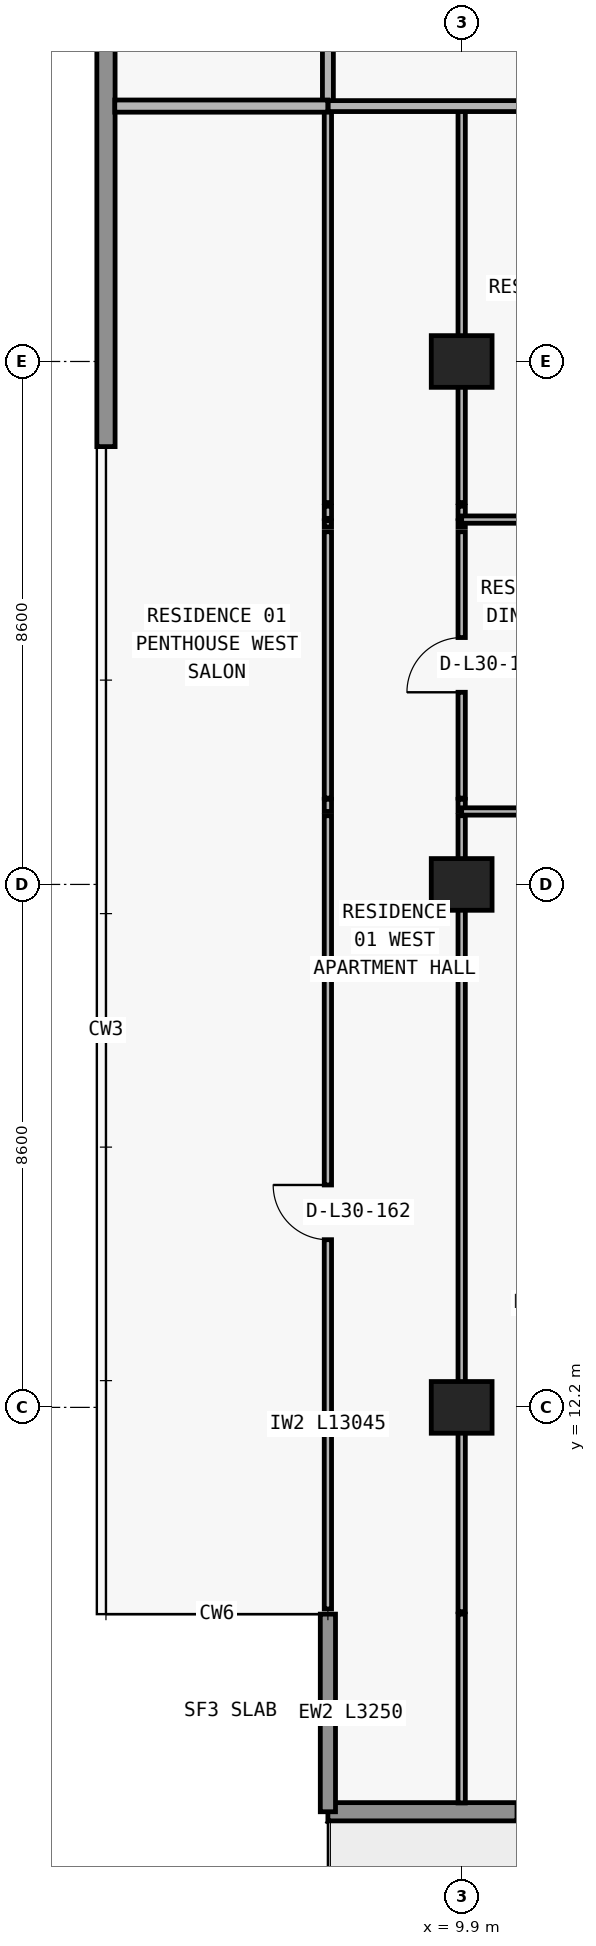
"""IFC4 building model, lengths in metres.
Left out: names, types, materials, properties, quantities, classifications, styles, units other than length and angle.
Written with IfcOpenShell. Run it as: python <this file> out.ifc"""

import sys

from ifc_helpers import new_model, si_unit, direction, frame, frame_2d, origin, origin_2d, place, context, subcontext, project, spatial, rectangle, extrude, element, fill, save


model = new_model("IFC4")
c1 = context("Model", 3, precision=1e-05, world=origin(), true_north=direction((0.0, 1.0)))
c2 = subcontext(c1, "Body", "Model", "MODEL_VIEW")
j1 = project(units=[si_unit("LENGTHUNIT", "METRE"), si_unit("PLANEANGLEUNIT", "RADIAN")], contexts=[c1])
p1 = place(None, origin())
s1 = spatial("IfcSite", under=j1, at=p1, CompositionType="ELEMENT")
p2 = place(p1, origin())
s2 = spatial("IfcBuilding", under=s1, at=p2, CompositionType="ELEMENT")
p3 = place(p2, frame((0.0, 0.0, 112.5)))
s3 = spatial("IfcBuildingStorey", under=s2, at=p3, CompositionType="ELEMENT", Elevation=112.5)
for number, where, z_axis, x_axis in (
    (1, (9.9, 12.2, 0.0), (0.0, 0.0, 1.0), (1.0, 0.0, 0.0)),
    (2, (9.9, 20.8, 0.0), (0.0, 0.0, 1.0), (1.0, 0.0, 0.0)),
    (3, (9.9, 29.4, 0.0), (0.0, 0.0, 1.0), (1.0, 0.0, 0.0)),
):
    element("IfcColumn", number, at=place(p3, frame(where, z_axis=z_axis, x_axis=x_axis)), inside=s3, PredefinedType="COLUMN", context=c2, shape_type="SweptSolid", body=[
        extrude(rectangle(XDim=1.0, YDim=0.85, at=origin_2d()), origin(), (0.0, 0.0, 1.0), 3.05),
    ])
p4 = place(p3, frame((70.1, 5.55, 0.0), z_axis=(0.0, 0.0, 1.0), x_axis=(-1.0, 0.0, 0.0)))
e4 = element("IfcWall", 4, at=p4, inside=s3, PredefinedType="STANDARD", context=c2, shape_type="SweptSolid", body=[
    extrude(rectangle(XDim=62.4, YDim=0.3, at=frame_2d((31.2, 0.0))), origin(), (0.0, 0.0, 1.0), 3.05),
])
p5 = place(p4, frame((57.29, 0.0, 0.0)))
e5 = element("IfcOpeningElement", 5, at=p5, cuts=e4, PredefinedType="OPENING", context=c2, shape_type="SweptSolid", body=[
    extrude(rectangle(XDim=2.0, YDim=2.3, at=frame_2d((1.0, 1.15))), frame((0.0, 0.16, 0.0), z_axis=(0.0, -1.0, 0.0), x_axis=(1.0, 0.0, 0.0)), (0.0, 0.0, 1.0), 0.32),
])
p6 = place(p4, frame((52.61, 0.0, 0.65)))
e6 = element("IfcOpeningElement", 6, at=p6, cuts=e4, PredefinedType="OPENING", context=c2, shape_type="SweptSolid", body=[
    extrude(rectangle(XDim=2.6, YDim=1.85, at=frame_2d((1.3, 0.925))), frame((0.0, 0.16, 0.0), z_axis=(0.0, -1.0, 0.0), x_axis=(1.0, 0.0, 0.0)), (0.0, 0.0, 1.0), 0.32),
])
p7 = place(p4, frame((46.5, 0.0, 0.85)))
e7 = element("IfcOpeningElement", 7, at=p7, cuts=e4, PredefinedType="OPENING", context=c2, shape_type="SweptSolid", body=[
    extrude(rectangle(XDim=2.2, YDim=1.55, at=frame_2d((1.1, 0.775))), frame((0.0, 0.16, 0.0), z_axis=(0.0, -1.0, 0.0), x_axis=(1.0, 0.0, 0.0)), (0.0, 0.0, 1.0), 0.32),
])
p8 = place(p4, frame((40.49, 0.0, 0.0)))
e8 = element("IfcOpeningElement", 8, at=p8, cuts=e4, PredefinedType="OPENING", context=c2, shape_type="SweptSolid", body=[
    extrude(rectangle(XDim=2.0, YDim=2.3, at=frame_2d((1.0, 1.15))), frame((0.0, 0.16, 0.0), z_axis=(0.0, -1.0, 0.0), x_axis=(1.0, 0.0, 0.0)), (0.0, 0.0, 1.0), 0.32),
])
p9 = place(p4, frame((35.81, 0.0, 0.65)))
e9 = element("IfcOpeningElement", 9, at=p9, cuts=e4, PredefinedType="OPENING", context=c2, shape_type="SweptSolid", body=[
    extrude(rectangle(XDim=2.6, YDim=1.85, at=frame_2d((1.3, 0.925))), frame((0.0, 0.16, 0.0), z_axis=(0.0, -1.0, 0.0), x_axis=(1.0, 0.0, 0.0)), (0.0, 0.0, 1.0), 0.32),
])
p10 = place(p4, frame((30.1, 0.0, 0.85)))
e10 = element("IfcOpeningElement", 10, at=p10, cuts=e4, PredefinedType="OPENING", context=c2, shape_type="SweptSolid", body=[
    extrude(rectangle(XDim=2.2, YDim=1.55, at=frame_2d((1.1, 0.775))), frame((0.0, 0.16, 0.0), z_axis=(0.0, -1.0, 0.0), x_axis=(1.0, 0.0, 0.0)), (0.0, 0.0, 1.0), 0.32),
])
p11 = place(p4, frame((24.426, 0.0, 0.0)))
e11 = element("IfcOpeningElement", 11, at=p11, cuts=e4, PredefinedType="OPENING", context=c2, shape_type="SweptSolid", body=[
    extrude(rectangle(XDim=2.0, YDim=2.3, at=frame_2d((1.0, 1.15))), frame((0.0, 0.16, 0.0), z_axis=(0.0, -1.0, 0.0), x_axis=(1.0, 0.0, 0.0)), (0.0, 0.0, 1.0), 0.32),
])
p12 = place(p4, frame((20.126, 0.0, 0.85)))
e12 = element("IfcOpeningElement", 12, at=p12, cuts=e4, PredefinedType="OPENING", context=c2, shape_type="SweptSolid", body=[
    extrude(rectangle(XDim=2.2, YDim=1.55, at=frame_2d((1.1, 0.775))), frame((0.0, 0.16, 0.0), z_axis=(0.0, -1.0, 0.0), x_axis=(1.0, 0.0, 0.0)), (0.0, 0.0, 1.0), 0.32),
])
p13 = place(p4, frame((15.69, 0.0, 0.0)))
e13 = element("IfcOpeningElement", 13, at=p13, cuts=e4, PredefinedType="OPENING", context=c2, shape_type="SweptSolid", body=[
    extrude(rectangle(XDim=2.0, YDim=2.3, at=frame_2d((1.0, 1.15))), frame((0.0, 0.16, 0.0), z_axis=(0.0, -1.0, 0.0), x_axis=(1.0, 0.0, 0.0)), (0.0, 0.0, 1.0), 0.32),
])
p14 = place(p4, frame((11.59, 0.0, 0.85)))
e14 = element("IfcOpeningElement", 14, at=p14, cuts=e4, PredefinedType="OPENING", context=c2, shape_type="SweptSolid", body=[
    extrude(rectangle(XDim=1.8, YDim=1.55, at=frame_2d((0.9, 0.775))), frame((0.0, 0.16, 0.0), z_axis=(0.0, -1.0, 0.0), x_axis=(1.0, 0.0, 0.0)), (0.0, 0.0, 1.0), 0.32),
])
p15 = place(p4, frame((7.626, 0.0, 0.0)))
e15 = element("IfcOpeningElement", 15, at=p15, cuts=e4, PredefinedType="OPENING", context=c2, shape_type="SweptSolid", body=[
    extrude(rectangle(XDim=2.0, YDim=2.3, at=frame_2d((1.0, 1.15))), frame((0.0, 0.16, 0.0), z_axis=(0.0, -1.0, 0.0), x_axis=(1.0, 0.0, 0.0)), (0.0, 0.0, 1.0), 0.32),
])
p16 = place(p4, frame((3.326, 0.0, 0.85)))
e16 = element("IfcOpeningElement", 16, at=p16, cuts=e4, PredefinedType="OPENING", context=c2, shape_type="SweptSolid", body=[
    extrude(rectangle(XDim=2.2, YDim=1.55, at=frame_2d((1.1, 0.775))), frame((0.0, 0.16, 0.0), z_axis=(0.0, -1.0, 0.0), x_axis=(1.0, 0.0, 0.0)), (0.0, 0.0, 1.0), 0.32),
])
p17 = place(p3, frame((7.7, 8.8, 0.0), z_axis=(0.0, 0.0, 1.0), x_axis=(0.0, -1.0, 0.0)))
e17 = element("IfcWall", 17, at=p17, inside=s3, PredefinedType="ELEMENTEDWALL", context=c2, shape_type="SweptSolid", body=[
    extrude(rectangle(XDim=3.25, YDim=0.25, at=frame_2d((1.625, 0.0))), origin(), (0.0, 0.0, 1.0), 3.05),
])
p18 = place(p3, frame((4.05, 28.0, 0.0), z_axis=(0.0, 0.0, 1.0), x_axis=(0.0, 1.0, 0.0)))
e18 = element("IfcWall", 18, at=p18, inside=s3, PredefinedType="STANDARD", context=c2, shape_type="SweptSolid", body=[
    extrude(rectangle(XDim=19.2, YDim=0.3, at=frame_2d((9.6, 0.0))), origin(), (0.0, 0.0, 1.0), 3.05),
])
p19 = place(p3, frame((7.7, 8.885, 0.0), z_axis=(0.0, 0.0, 1.0), x_axis=(0.0, 1.0, 0.0)))
e19 = element("IfcWall", 19, at=p19, inside=s3, PredefinedType="PARTITIONING", context=c2, shape_type="SweptSolid", body=[
    extrude(rectangle(XDim=13.045, YDim=0.12, at=frame_2d((6.522, 0.0))), origin(), (0.0, 0.0, 1.0), 3.05),
])
p20 = place(p19, frame((6.073, 0.0, 0.0)))
e20 = element("IfcOpeningElement", 20, at=p20, cuts=e19, PredefinedType="OPENING", context=c2, shape_type="SweptSolid", body=[
    extrude(rectangle(XDim=0.9, YDim=2.15, at=frame_2d((0.45, 1.075))), frame((0.0, 0.07, 0.0), z_axis=(0.0, -1.0, 0.0), x_axis=(1.0, 0.0, 0.0)), (0.0, 0.0, 1.0), 0.14),
])
p21 = place(p3, frame((7.7, 22.0, 0.0), z_axis=(0.0, 0.0, 1.0), x_axis=(0.0, 1.0, 0.0)))
e21 = element("IfcWall", 21, at=p21, inside=s3, PredefinedType="PARTITIONING", context=c2, shape_type="SweptSolid", body=[
    extrude(rectangle(XDim=0.2, YDim=0.12, at=frame_2d((0.1, 0.0))), origin(), (0.0, 0.0, 1.0), 3.05),
])
p22 = place(p3, frame((7.7, 22.22, 0.0), z_axis=(0.0, 0.0, 1.0), x_axis=(0.0, 1.0, 0.0)))
e22 = element("IfcWall", 22, at=p22, inside=s3, PredefinedType="PARTITIONING", context=c2, shape_type="SweptSolid", body=[
    extrude(rectangle(XDim=4.38, YDim=0.12, at=frame_2d((2.19, 0.0))), origin(), (0.0, 0.0, 1.0), 3.05),
])
p23 = place(p3, frame((7.7, 26.68, 0.0), z_axis=(0.0, 0.0, 1.0), x_axis=(0.0, 1.0, 0.0)))
e23 = element("IfcWall", 23, at=p23, inside=s3, PredefinedType="PARTITIONING", context=c2, shape_type="SweptSolid", body=[
    extrude(rectangle(XDim=0.1, YDim=0.12, at=frame_2d((0.05, 0.0))), origin(), (0.0, 0.0, 1.0), 3.05),
])
p24 = place(p3, frame((7.7, 26.82, 0.0), z_axis=(0.0, 0.0, 1.0), x_axis=(0.0, 1.0, 0.0)))
e24 = element("IfcWall", 24, at=p24, inside=s3, PredefinedType="PARTITIONING", context=c2, shape_type="SweptSolid", body=[
    extrude(rectangle(XDim=0.2, YDim=0.12, at=frame_2d((0.1, 0.0))), origin(), (0.0, 0.0, 1.0), 3.05),
])
p25 = place(p3, frame((7.7, 27.08, 0.0), z_axis=(0.0, 0.0, 1.0), x_axis=(0.0, 1.0, 0.0)))
e25 = element("IfcWall", 25, at=p25, inside=s3, PredefinedType="PARTITIONING", context=c2, shape_type="SweptSolid", body=[
    extrude(rectangle(XDim=6.52, YDim=0.12, at=frame_2d((3.26, 0.0))), origin(), (0.0, 0.0, 1.0), 3.05),
])
p26 = place(p3, frame((7.7, 33.605, 0.0), z_axis=(0.0, 0.0, 1.0), x_axis=(0.0, 1.0, 0.0)))
e26 = element("IfcWall", 26, at=p26, inside=s3, PredefinedType="PARTITIONING", context=c2, shape_type="SweptSolid", body=[
    extrude(rectangle(XDim=3.345, YDim=0.18, at=frame_2d((1.672, 0.0))), origin(), (0.0, 0.0, 1.0), 3.05),
])
p27 = place(p3, frame((9.9, 5.695, 0.0), z_axis=(0.0, 0.0, 1.0), x_axis=(0.0, 1.0, 0.0)))
e27 = element("IfcWall", 27, at=p27, inside=s3, PredefinedType="PARTITIONING", context=c2, shape_type="SweptSolid", body=[
    extrude(rectangle(XDim=3.105, YDim=0.12, at=frame_2d((1.552, 0.0))), origin(), (0.0, 0.0, 1.0), 3.05),
])
p28 = place(p3, frame((9.9, 8.84, 0.0), z_axis=(0.0, 0.0, 1.0), x_axis=(0.0, 1.0, 0.0)))
e28 = element("IfcWall", 28, at=p28, inside=s3, PredefinedType="PARTITIONING", context=c2, shape_type="SweptSolid", body=[
    extrude(rectangle(XDim=13.09, YDim=0.12, at=frame_2d((6.545, 0.0))), origin(), (0.0, 0.0, 1.0), 2.174),
])
p29 = place(p3, frame((9.9, 22.0, 0.0), z_axis=(0.0, 0.0, 1.0), x_axis=(0.0, 1.0, 0.0)))
e29 = element("IfcWall", 29, at=p29, inside=s3, PredefinedType="PARTITIONING", context=c2, shape_type="SweptSolid", body=[
    extrude(rectangle(XDim=0.2, YDim=0.12, at=frame_2d((0.1, 0.0))), origin(), (0.0, 0.0, 1.0), 2.174),
])
p30 = place(p3, frame((9.9, 22.22, 0.0), z_axis=(0.0, 0.0, 1.0), x_axis=(0.0, 1.0, 0.0)))
e30 = element("IfcWall", 30, at=p30, inside=s3, PredefinedType="PARTITIONING", context=c2, shape_type="SweptSolid", body=[
    extrude(rectangle(XDim=4.38, YDim=0.12, at=frame_2d((2.19, 0.0))), origin(), (0.0, 0.0, 1.0), 2.174),
])
p31 = place(p30, frame((1.74, 0.0, 0.0)))
e31 = element("IfcOpeningElement", 31, at=p31, cuts=e30, PredefinedType="OPENING", context=c2, shape_type="SweptSolid", body=[
    extrude(rectangle(XDim=0.9, YDim=2.124, at=frame_2d((0.45, 1.062))), frame((0.0, 0.07, 0.0), z_axis=(0.0, -1.0, 0.0), x_axis=(1.0, 0.0, 0.0)), (0.0, 0.0, 1.0), 0.14),
])
p32 = place(p3, frame((9.9, 26.68, 0.0), z_axis=(0.0, 0.0, 1.0), x_axis=(0.0, 1.0, 0.0)))
e32 = element("IfcWall", 32, at=p32, inside=s3, PredefinedType="PARTITIONING", context=c2, shape_type="SweptSolid", body=[
    extrude(rectangle(XDim=0.1, YDim=0.12, at=frame_2d((0.05, 0.0))), origin(), (0.0, 0.0, 1.0), 2.174),
])
p33 = place(p3, frame((9.9, 26.82, 0.0), z_axis=(0.0, 0.0, 1.0), x_axis=(0.0, 1.0, 0.0)))
e33 = element("IfcWall", 33, at=p33, inside=s3, PredefinedType="PARTITIONING", context=c2, shape_type="SweptSolid", body=[
    extrude(rectangle(XDim=0.2, YDim=0.12, at=frame_2d((0.1, 0.0))), origin(), (0.0, 0.0, 1.0), 2.174),
])
p34 = place(p3, frame((9.9, 27.08, 0.0), z_axis=(0.0, 0.0, 1.0), x_axis=(0.0, 1.0, 0.0)))
e34 = element("IfcWall", 34, at=p34, inside=s3, PredefinedType="PARTITIONING", context=c2, shape_type="SweptSolid", body=[
    extrude(rectangle(XDim=6.52, YDim=0.12, at=frame_2d((3.26, 0.0))), origin(), (0.0, 0.0, 1.0), 2.174),
])
p35 = place(p3, frame((9.9, 22.0, 0.0), z_axis=(0.0, 0.0, 1.0), x_axis=(1.0, 0.0, 0.0)))
e35 = element("IfcWall", 35, at=p35, inside=s3, PredefinedType="PARTITIONING", context=c2, shape_type="SweptSolid", body=[
    extrude(rectangle(XDim=8.35, YDim=0.12, at=frame_2d((4.175, 0.0))), origin(), (0.0, 0.0, 1.0), 3.05),
])
p36 = place(p35, frame((1.44, 0.0, 0.0)))
e36 = element("IfcOpeningElement", 36, at=p36, cuts=e35, PredefinedType="OPENING", context=c2, shape_type="SweptSolid", body=[
    extrude(rectangle(XDim=0.9, YDim=2.15, at=frame_2d((0.45, 1.075))), frame((0.0, 0.07, 0.0), z_axis=(0.0, -1.0, 0.0), x_axis=(1.0, 0.0, 0.0)), (0.0, 0.0, 1.0), 0.14),
])
p37 = place(p3, frame((9.9, 26.8, 0.0), z_axis=(0.0, 0.0, 1.0), x_axis=(1.0, 0.0, 0.0)))
e37 = element("IfcWall", 37, at=p37, inside=s3, PredefinedType="PARTITIONING", context=c2, shape_type="SweptSolid", body=[
    extrude(rectangle(XDim=8.35, YDim=0.12, at=frame_2d((4.175, 0.0))), origin(), (0.0, 0.0, 1.0), 3.05),
])
p38 = place(p37, frame((1.44, 0.0, 0.0)))
e38 = element("IfcOpeningElement", 38, at=p38, cuts=e37, PredefinedType="OPENING", context=c2, shape_type="SweptSolid", body=[
    extrude(rectangle(XDim=0.9, YDim=2.15, at=frame_2d((0.45, 1.075))), frame((0.0, 0.07, 0.0), z_axis=(0.0, -1.0, 0.0), x_axis=(1.0, 0.0, 0.0)), (0.0, 0.0, 1.0), 0.14),
])
p39 = place(p3, frame((4.195, 33.6, 0.0), z_axis=(0.0, 0.0, 1.0), x_axis=(1.0, 0.0, 0.0)))
e39 = element("IfcWall", 39, at=p39, inside=s3, PredefinedType="PARTITIONING", context=c2, shape_type="SweptSolid", body=[
    extrude(rectangle(XDim=3.505, YDim=0.2, at=frame_2d((1.752, 0.0))), origin(), (0.0, 0.0, 1.0), 3.05),
])
p40 = place(p3, frame((7.705, 33.6, 0.0), z_axis=(0.0, 0.0, 1.0), x_axis=(1.0, 0.0, 0.0)))
e40 = element("IfcWall", 40, at=p40, inside=s3, PredefinedType="PARTITIONING", context=c2, shape_type="SweptSolid", body=[
    extrude(rectangle(XDim=10.545, YDim=0.18, at=frame_2d((5.272, 0.0))), origin(), (0.0, 0.0, 1.0), 3.05),
])
p41 = place(p40, frame((5.137, 0.0, 0.0)))
e41 = element("IfcOpeningElement", 41, at=p41, cuts=e40, PredefinedType="OPENING", context=c2, shape_type="SweptSolid", body=[
    extrude(rectangle(XDim=1.0, YDim=2.2, at=frame_2d((0.5, 1.1))), frame((0.0, 0.1, 0.0), z_axis=(0.0, -1.0, 0.0), x_axis=(1.0, 0.0, 0.0)), (0.0, 0.0, 1.0), 0.2),
])
p42 = place(p31, origin())
e42 = element("IfcDoor", 42, at=p42, inside=s3, OperationType="SINGLE_SWING_LEFT", PredefinedType="DOOR", context=c2, shape_type="SweptSolid", body=[
    extrude(rectangle(XDim=0.9, YDim=2.124, at=frame_2d((0.45, 1.062))), frame((0.0, 0.025, 0.0), z_axis=(0.0, -1.0, 0.0), x_axis=(1.0, 0.0, 0.0)), (0.0, 0.0, 1.0), 0.05),
])
fill(e31, e42)
p43 = place(p20, origin())
e43 = element("IfcDoor", 43, at=p43, inside=s3, OperationType="SINGLE_SWING_RIGHT", PredefinedType="DOOR", context=c2, shape_type="SweptSolid", body=[
    extrude(rectangle(XDim=0.9, YDim=2.15, at=frame_2d((0.45, 1.075))), frame((0.0, 0.025, 0.0), z_axis=(0.0, -1.0, 0.0), x_axis=(1.0, 0.0, 0.0)), (0.0, 0.0, 1.0), 0.05),
])
fill(e20, e43)
save(model, sys.argv[1])
